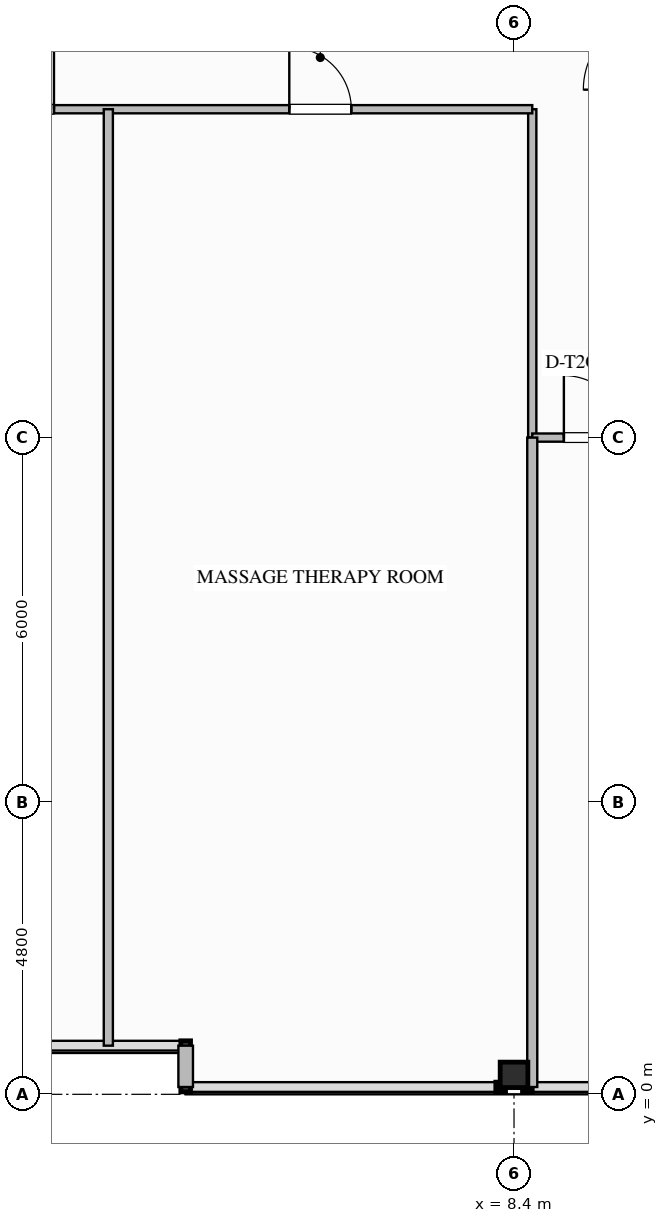
"""IFC4 building model, lengths in metres.
Left out: names, types, materials, properties, quantities, classifications, styles, units other than length and angle.
Written with IfcOpenShell. Run it as: python <this file> out.ifc"""

import sys

from ifc_helpers import new_model, si_unit, direction, frame, frame_2d, origin, origin_2d, place, context, subcontext, project, spatial, rectangle, i_section, extrude, element, fill, save


model = new_model("IFC4")
c1 = context("Model", 3, precision=1e-05, world=origin(), true_north=direction((0.0, 1.0)))
c2 = subcontext(c1, "Body", "Model", "MODEL_VIEW")
j1 = project(units=[si_unit("LENGTHUNIT", "METRE"), si_unit("PLANEANGLEUNIT", "RADIAN")], contexts=[c1])
p1 = place(None, origin())
s1 = spatial("IfcSite", under=j1, at=p1, CompositionType="ELEMENT")
p2 = place(p1, origin())
s2 = spatial("IfcBuilding", under=s1, at=p2, CompositionType="ELEMENT")
p3 = place(p2, frame((0.0, 0.0, 112.8)))
s3 = spatial("IfcBuildingStorey", under=s2, at=p3, CompositionType="ELEMENT", Elevation=112.8)
p4 = place(p3, frame((8.4, 0.32, 0.0), z_axis=(0.0, 0.0, 1.0), x_axis=(0.0, 1.0, 0.0)))
e1 = element("IfcColumn", 1, at=p4, inside=s3, PredefinedType="COLUMN", context=c2, shape_type="SweptSolid", body=[
    extrude(i_section(OverallWidth=0.418, OverallDepth=0.455, WebThickness=0.042, FlangeThickness=0.068, FilletRadius=0.03, at=origin_2d()), origin(), (0.0, 0.0, 1.0), 3.497),
])
p5 = place(p3, frame((3.0, 0.12, 0.0), z_axis=(0.0, 0.0, 1.0), x_axis=(0.0, 1.0, 0.0)))
e2 = element("IfcWall", 2, at=p5, inside=s3, PredefinedType="STANDARD", context=c2, shape_type="SweptSolid", body=[
    extrude(rectangle(XDim=0.68, YDim=0.24, at=frame_2d((0.34, 0.0))), origin(), (0.0, 0.0, 1.0), 3.24),
])
p6 = place(p3, frame((8.7, 10.8, 0.0), z_axis=(0.0, 0.0, 1.0), x_axis=(0.0, 1.0, 0.0)))
e3 = element("IfcWall", 3, at=p6, inside=s3, PredefinedType="PARTITIONING", context=c2, shape_type="SweptSolid", body=[
    extrude(rectangle(XDim=5.4, YDim=0.135, at=frame_2d((2.7, 0.0))), origin(), (0.0, 0.0, 1.0), 3.24),
])
p7 = place(p3, frame((-16.2, 16.2, 0.0), z_axis=(0.0, 0.0, 1.0), x_axis=(1.0, 0.0, 0.0)))
e4 = element("IfcWall", 4, at=p7, inside=s3, PredefinedType="PARTITIONING", context=c2, shape_type="SweptSolid", body=[
    extrude(rectangle(XDim=24.9, YDim=0.135, at=frame_2d((12.45, 0.0))), origin(), (0.0, 0.0, 1.0), 3.24),
])
p8 = place(p7, frame((3.225, 0.0, 0.0)))
e5 = element("IfcOpeningElement", 5, at=p8, cuts=e4, PredefinedType="OPENING", context=c2, shape_type="SweptSolid", body=[
    extrude(rectangle(XDim=0.96, YDim=2.15, at=frame_2d((0.48, 1.075))), frame((0.0, 0.077, 0.0), z_axis=(0.0, -1.0, 0.0), x_axis=(1.0, 0.0, 0.0)), (0.0, 0.0, 1.0), 0.155),
])
p9 = place(p7, frame((8.205, 0.0, 0.0)))
e6 = element("IfcOpeningElement", 6, at=p9, cuts=e4, PredefinedType="OPENING", context=c2, shape_type="SweptSolid", body=[
    extrude(rectangle(XDim=1.02, YDim=2.15, at=frame_2d((0.51, 1.075))), frame((0.0, 0.077, 0.0), z_axis=(0.0, -1.0, 0.0), x_axis=(1.0, 0.0, 0.0)), (0.0, 0.0, 1.0), 0.155),
])
p10 = place(p7, frame((15.774, 0.0, 0.0)))
e7 = element("IfcOpeningElement", 7, at=p10, cuts=e4, PredefinedType="OPENING", context=c2, shape_type="SweptSolid", body=[
    extrude(rectangle(XDim=1.26, YDim=2.2, at=frame_2d((0.63, 1.1))), frame((0.0, 0.077, 0.0), z_axis=(0.0, -1.0, 0.0), x_axis=(1.0, 0.0, 0.0)), (0.0, 0.0, 1.0), 0.155),
])
p11 = place(p7, frame((20.904, 0.0, 0.0)))
e8 = element("IfcOpeningElement", 8, at=p11, cuts=e4, PredefinedType="OPENING", context=c2, shape_type="SweptSolid", body=[
    extrude(rectangle(XDim=1.02, YDim=2.15, at=frame_2d((0.51, 1.075))), frame((0.0, 0.077, 0.0), z_axis=(0.0, -1.0, 0.0), x_axis=(1.0, 0.0, 0.0)), (0.0, 0.0, 1.0), 0.155),
])
p12 = place(p3, frame((8.7, 10.8, 0.0), z_axis=(0.0, 0.0, 1.0), x_axis=(1.0, 0.0, 0.0)))
e9 = element("IfcWall", 9, at=p12, inside=s3, PredefinedType="PARTITIONING", context=c2, shape_type="SweptSolid", body=[
    extrude(rectangle(XDim=2.1, YDim=0.135, at=frame_2d((1.05, 0.0))), origin(), (0.0, 0.0, 1.0), 2.452),
])
p13 = place(p12, frame((0.52, 0.0, 0.0)))
e10 = element("IfcOpeningElement", 10, at=p13, cuts=e9, PredefinedType="OPENING", context=c2, shape_type="SweptSolid", body=[
    extrude(rectangle(XDim=1.02, YDim=2.15, at=frame_2d((0.51, 1.075))), frame((0.0, 0.077, 0.0), z_axis=(0.0, -1.0, 0.0), x_axis=(1.0, 0.0, 0.0)), (0.0, 0.0, 1.0), 0.155),
])
p14 = place(p3, frame((8.7, 0.12, 0.0), z_axis=(0.0, 0.0, 1.0), x_axis=(0.0, 1.0, 0.0)))
e11 = element("IfcWall", 11, at=p14, inside=s3, PredefinedType="PARTITIONING", context=c2, shape_type="SweptSolid", body=[
    extrude(rectangle(XDim=10.68, YDim=0.165, at=frame_2d((5.34, 0.0))), origin(), (0.0, 0.0, 1.0), 2.452),
])
p15 = place(p3, frame((1.728, 0.8, 0.0), z_axis=(0.0, 0.0, 1.0), x_axis=(0.0, 1.0, 0.0)))
e12 = element("IfcWall", 12, at=p15, inside=s3, PredefinedType="PARTITIONING", context=c2, shape_type="SweptSolid", body=[
    extrude(rectangle(XDim=15.4, YDim=0.15, at=frame_2d((7.7, 0.0))), origin(), (0.0, 0.0, 1.0), 3.24),
])
p16 = place(p13, origin())
e13 = element("IfcDoor", 13, at=p16, inside=s3, OperationType="SINGLE_SWING_LEFT", PredefinedType="DOOR", context=c2, shape_type="SweptSolid", body=[
    extrude(rectangle(XDim=1.02, YDim=2.15, at=frame_2d((0.51, 1.075))), frame((0.0, 0.025, 0.0), z_axis=(0.0, -1.0, 0.0), x_axis=(1.0, 0.0, 0.0)), (0.0, 0.0, 1.0), 0.05),
])
fill(e10, e13)
p17 = place(p10, origin())
e14 = element("IfcDoor", 14, at=p17, inside=s3, OperationType="SINGLE_SWING_RIGHT", PredefinedType="DOOR", context=c2, shape_type="SweptSolid", body=[
    extrude(rectangle(XDim=1.26, YDim=2.2, at=frame_2d((0.63, 1.1))), frame((0.0, 0.025, 0.0), z_axis=(0.0, -1.0, 0.0), x_axis=(1.0, 0.0, 0.0)), (0.0, 0.0, 1.0), 0.05),
])
fill(e7, e14)
p18 = place(p11, origin())
e15 = element("IfcDoor", 15, at=p18, inside=s3, OperationType="SINGLE_SWING_LEFT", PredefinedType="DOOR", context=c2, shape_type="SweptSolid", body=[
    extrude(rectangle(XDim=1.02, YDim=2.15, at=frame_2d((0.51, 1.075))), frame((0.0, 0.025, 0.0), z_axis=(0.0, -1.0, 0.0), x_axis=(1.0, 0.0, 0.0)), (0.0, 0.0, 1.0), 0.05),
])
fill(e8, e15)
save(model, sys.argv[1])
